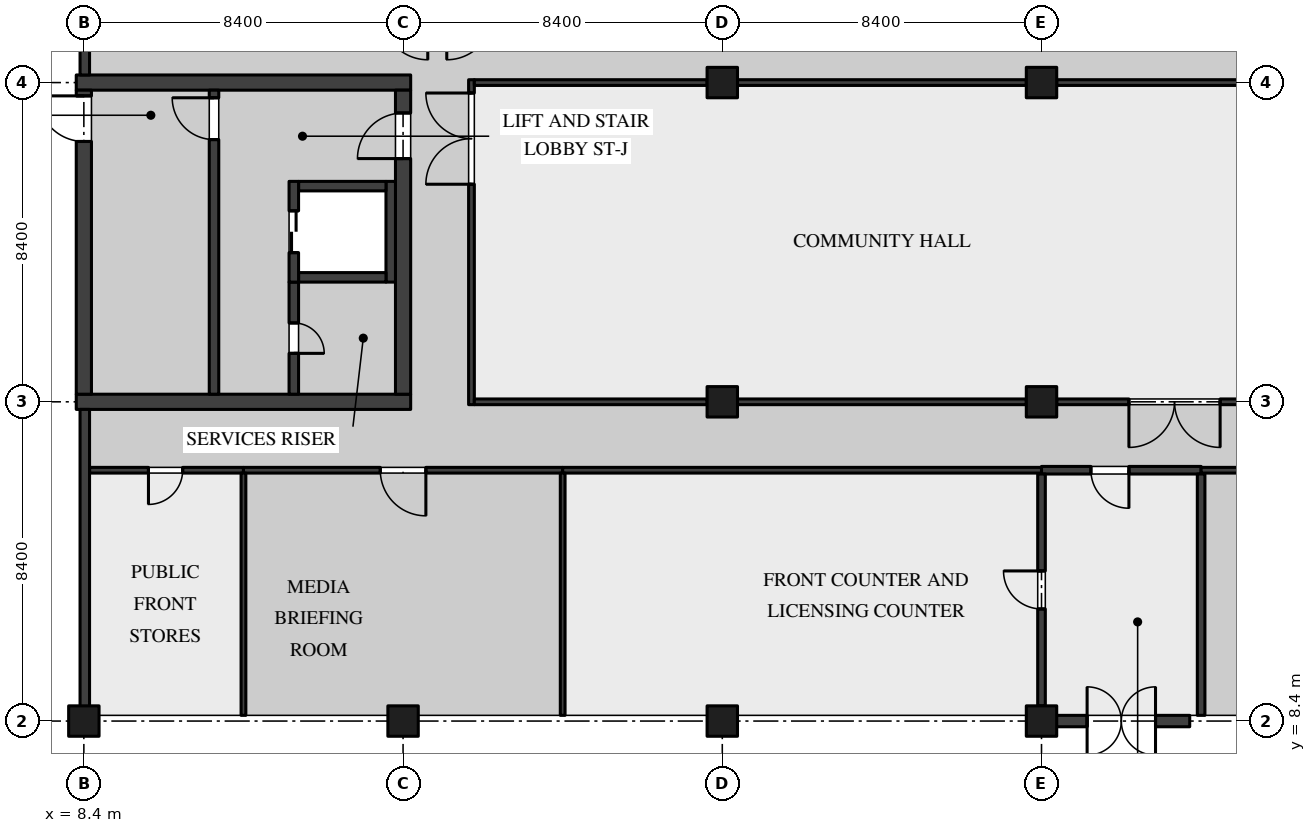
"""IFC4 building model, lengths in metres.
Left out: names, types, materials, properties, quantities, classifications, styles, units other than length and angle.
Written with IfcOpenShell. Run it as: python <this file> out.ifc"""

import sys

from ifc_helpers import new_model, si_unit, direction, frame, frame_2d, origin, origin_2d, place, context, subcontext, project, spatial, rectangle, extrude, element, fill, save


model = new_model("IFC4")
c1 = context("Model", 3, precision=1e-05, world=origin(), true_north=direction((0.0, 1.0)))
c2 = subcontext(c1, "Body", "Model", "MODEL_VIEW")
j1 = project(units=[si_unit("LENGTHUNIT", "METRE"), si_unit("PLANEANGLEUNIT", "RADIAN")], contexts=[c1])
p1 = place(None, origin())
s1 = spatial("IfcSite", under=j1, at=p1, CompositionType="ELEMENT")
p2 = place(p1, origin())
s2 = spatial("IfcBuilding", under=s1, at=p2, CompositionType="ELEMENT")
p3 = place(p2, origin())
s3 = spatial("IfcBuildingStorey", under=s2, at=p3, CompositionType="ELEMENT", Elevation=0.0)
for number, where, z_axis, x_axis in (
    (1, (8.4, 8.4, 0.0), (0.0, 0.0, 1.0), (1.0, 0.0, 0.0)),
    (2, (16.8, 8.4, 0.0), (0.0, 0.0, 1.0), (1.0, 0.0, 0.0)),
    (3, (25.2, 8.4, 0.0), (0.0, 0.0, 1.0), (1.0, 0.0, 0.0)),
    (4, (25.2, 16.8, 0.0), (0.0, 0.0, 1.0), (1.0, 0.0, 0.0)),
    (5, (25.2, 25.2, 0.0), (0.0, 0.0, 1.0), (1.0, 0.0, 0.0)),
    (6, (33.6, 8.4, 0.0), (0.0, 0.0, 1.0), (1.0, 0.0, 0.0)),
    (7, (33.6, 16.8, 0.0), (0.0, 0.0, 1.0), (1.0, 0.0, 0.0)),
    (8, (33.6, 25.2, 0.0), (0.0, 0.0, 1.0), (1.0, 0.0, 0.0)),
):
    element("IfcColumn", number, at=place(p3, frame(where, z_axis=z_axis, x_axis=x_axis)), inside=s3, PredefinedType="COLUMN", context=c2, shape_type="SweptSolid", body=[
        extrude(rectangle(XDim=0.8, YDim=0.8, at=origin_2d()), origin(), (0.0, 0.0, 1.0), 5.05),
    ])
for number, where, z_axis, x_axis in (
    (9, (8.2, 16.8, 0.0), (0.0, 0.0, 1.0), (1.0, 0.0, 0.0)),
    (10, (8.2, 25.2, 0.0), (0.0, 0.0, 1.0), (1.0, 0.0, 0.0)),
):
    element("IfcWall", number, at=place(p3, frame(where, z_axis=z_axis, x_axis=x_axis)), inside=s3, PredefinedType="SHEAR", context=c2, shape_type="SweptSolid", body=[
        extrude(rectangle(XDim=8.8, YDim=0.4, at=frame_2d((4.4, 0.0))), origin(), (0.0, 0.0, 1.0), 5.05),
    ])
p4 = place(p3, frame((8.4, 17.0, 0.0), z_axis=(0.0, 0.0, 1.0), x_axis=(0.0, 1.0, 0.0)))
e11 = element("IfcWall", 11, at=p4, inside=s3, PredefinedType="SHEAR", context=c2, shape_type="SweptSolid", body=[
    extrude(rectangle(XDim=8.0, YDim=0.4, at=frame_2d((4.0, 0.0))), origin(), (0.0, 0.0, 1.0), 5.05),
])
p5 = place(p4, frame((6.65, 0.0, 0.0)))
e12 = element("IfcOpeningElement", 12, at=p5, cuts=e11, PredefinedType="OPENING", context=c2, shape_type="SweptSolid", body=[
    extrude(rectangle(XDim=1.2, YDim=2.1, at=frame_2d((0.6, 1.05))), frame((0.0, 0.21, 0.0), z_axis=(0.0, -1.0, 0.0), x_axis=(1.0, 0.0, 0.0)), (0.0, 0.0, 1.0), 0.42),
])
p6 = place(p3, frame((16.8, 17.0, 0.0), z_axis=(0.0, 0.0, 1.0), x_axis=(0.0, 1.0, 0.0)))
e13 = element("IfcWall", 13, at=p6, inside=s3, PredefinedType="SHEAR", context=c2, shape_type="SweptSolid", body=[
    extrude(rectangle(XDim=8.0, YDim=0.4, at=frame_2d((4.0, 0.0))), origin(), (0.0, 0.0, 1.0), 5.05),
])
p7 = place(p6, frame((6.2, 0.0, 0.0)))
e14 = element("IfcOpeningElement", 14, at=p7, cuts=e13, PredefinedType="OPENING", context=c2, shape_type="SweptSolid", body=[
    extrude(rectangle(XDim=1.2, YDim=2.1, at=frame_2d((0.6, 1.05))), frame((0.0, 0.21, 0.0), z_axis=(0.0, -1.0, 0.0), x_axis=(1.0, 0.0, 0.0)), (0.0, 0.0, 1.0), 0.42),
])
p8 = place(p3, frame((11.825, 25.0, 0.0), z_axis=(0.0, 0.0, 1.0), x_axis=(0.0, -1.0, 0.0)))
e15 = element("IfcWall", 15, at=p8, inside=s3, PredefinedType="SOLIDWALL", context=c2, shape_type="SweptSolid", body=[
    extrude(rectangle(XDim=8.0, YDim=0.25, at=frame_2d((4.0, 0.0))), origin(), (0.0, 0.0, 1.0), 5.05),
])
p9 = place(p8, frame((0.2, 0.0, 0.0)))
e16 = element("IfcOpeningElement", 16, at=p9, cuts=e15, PredefinedType="OPENING", context=c2, shape_type="SweptSolid", body=[
    extrude(rectangle(XDim=1.1, YDim=2.1, at=frame_2d((0.55, 1.05))), frame((0.0, 0.135, 0.0), z_axis=(0.0, -1.0, 0.0), x_axis=(1.0, 0.0, 0.0)), (0.0, 0.0, 1.0), 0.27),
])
p10 = place(p3, frame((13.925, 19.95, 0.0), z_axis=(0.0, 0.0, 1.0), x_axis=(0.0, -1.0, 0.0)))
e17 = element("IfcWall", 17, at=p10, inside=s3, PredefinedType="SOLIDWALL", context=c2, shape_type="SweptSolid", body=[
    extrude(rectangle(XDim=2.95, YDim=0.25, at=frame_2d((1.475, 0.0))), origin(), (0.0, 0.0, 1.0), 5.05),
])
p11 = place(p10, frame((1.075, 0.0, 0.0)))
e18 = element("IfcOpeningElement", 18, at=p11, cuts=e17, PredefinedType="OPENING", context=c2, shape_type="SweptSolid", body=[
    extrude(rectangle(XDim=0.8, YDim=2.1, at=frame_2d((0.4, 1.05))), frame((0.0, 0.135, 0.0), z_axis=(0.0, -1.0, 0.0), x_axis=(1.0, 0.0, 0.0)), (0.0, 0.0, 1.0), 0.27),
])
p12 = place(p3, frame((16.475, 19.95, 0.0), z_axis=(0.0, 0.0, 1.0), x_axis=(0.0, 1.0, 0.0)))
e19 = element("IfcWall", 19, at=p12, inside=s3, PredefinedType="SOLIDWALL", context=c2, shape_type="SweptSolid", body=[
    extrude(rectangle(XDim=2.65, YDim=0.25, at=frame_2d((1.325, 0.0))), origin(), (0.0, 0.0, 1.0), 5.05),
])
for number, where, z_axis, x_axis in (
    (20, (14.05, 22.475, 0.0), (0.0, 0.0, 1.0), (1.0, 0.0, 0.0)),
    (21, (14.05, 20.075, 0.0), (0.0, 0.0, 1.0), (1.0, 0.0, 0.0)),
):
    element("IfcWall", number, at=place(p3, frame(where, z_axis=z_axis, x_axis=x_axis)), inside=s3, PredefinedType="SOLIDWALL", context=c2, shape_type="SweptSolid", body=[
        extrude(rectangle(XDim=2.3, YDim=0.25, at=frame_2d((1.15, 0.0))), origin(), (0.0, 0.0, 1.0), 5.05),
    ])
p13 = place(p3, frame((13.925, 19.95, 0.0), z_axis=(0.0, 0.0, 1.0), x_axis=(0.0, 1.0, 0.0)))
e22 = element("IfcWall", 22, at=p13, inside=s3, PredefinedType="SOLIDWALL", context=c2, shape_type="SweptSolid", body=[
    extrude(rectangle(XDim=2.65, YDim=0.25, at=frame_2d((1.325, 0.0))), origin(), (0.0, 0.0, 1.0), 5.05),
])
p14 = place(p13, frame((0.775, 0.0, 0.0)))
e23 = element("IfcOpeningElement", 23, at=p14, cuts=e22, PredefinedType="OPENING", context=c2, shape_type="SweptSolid", body=[
    extrude(rectangle(XDim=1.1, YDim=2.1, at=frame_2d((0.55, 1.05))), frame((0.0, 0.135, 0.0), z_axis=(0.0, -1.0, 0.0), x_axis=(1.0, 0.0, 0.0)), (0.0, 0.0, 1.0), 0.27),
])
p15 = place(p3, frame((18.6, 16.725, 0.0), z_axis=(0.0, 0.0, 1.0), x_axis=(0.0, 1.0, 0.0)))
e24 = element("IfcWall", 24, at=p15, inside=s3, PredefinedType="PARTITIONING", context=c2, shape_type="SweptSolid", body=[
    extrude(rectangle(XDim=8.55, YDim=0.15, at=frame_2d((4.275, 0.0))), origin(), (0.0, 0.0, 1.0), 5.05),
])
p16 = place(p15, frame((5.8, 0.0, 0.0)))
e25 = element("IfcOpeningElement", 25, at=p16, cuts=e24, PredefinedType="OPENING", context=c2, shape_type="SweptSolid", body=[
    extrude(rectangle(XDim=2.4, YDim=2.7, at=frame_2d((1.2, 1.35))), frame((0.0, 0.085, 0.0), z_axis=(0.0, -1.0, 0.0), x_axis=(1.0, 0.0, 0.0)), (0.0, 0.0, 1.0), 0.17),
])
p17 = place(p3, frame((18.675, 16.8, 0.0), z_axis=(0.0, 0.0, 1.0), x_axis=(1.0, 0.0, 0.0)))
e26 = element("IfcWall", 26, at=p17, inside=s3, PredefinedType="PARTITIONING", context=c2, shape_type="SweptSolid", body=[
    extrude(rectangle(XDim=6.125, YDim=0.15, at=frame_2d((3.062, 0.0))), origin(), (0.0, 0.0, 1.0), 5.05),
])
p18 = place(p3, frame((25.6, 16.8, 0.0), z_axis=(0.0, 0.0, 1.0), x_axis=(1.0, 0.0, 0.0)))
e27 = element("IfcWall", 27, at=p18, inside=s3, PredefinedType="PARTITIONING", context=c2, shape_type="SweptSolid", body=[
    extrude(rectangle(XDim=7.6, YDim=0.15, at=frame_2d((3.8, 0.0))), origin(), (0.0, 0.0, 1.0), 5.05),
])
p19 = place(p3, frame((34.0, 16.8, 0.0), z_axis=(0.0, 0.0, 1.0), x_axis=(1.0, 0.0, 0.0)))
e28 = element("IfcWall", 28, at=p19, inside=s3, PredefinedType="PARTITIONING", context=c2, shape_type="SweptSolid", body=[
    extrude(rectangle(XDim=6.2, YDim=0.15, at=frame_2d((3.1, 0.0))), origin(), (0.0, 0.0, 1.0), 5.05),
])
p20 = place(p19, frame((1.9, 0.0, 0.0)))
e29 = element("IfcOpeningElement", 29, at=p20, cuts=e28, PredefinedType="OPENING", context=c2, shape_type="SweptSolid", body=[
    extrude(rectangle(XDim=2.4, YDim=2.7, at=frame_2d((1.2, 1.35))), frame((0.0, 0.085, 0.0), z_axis=(0.0, -1.0, 0.0), x_axis=(1.0, 0.0, 0.0)), (0.0, 0.0, 1.0), 0.17),
])
p21 = place(p3, frame((18.675, 25.2, 0.0), z_axis=(0.0, 0.0, 1.0), x_axis=(1.0, 0.0, 0.0)))
e30 = element("IfcWall", 30, at=p21, inside=s3, PredefinedType="PARTITIONING", context=c2, shape_type="SweptSolid", body=[
    extrude(rectangle(XDim=6.125, YDim=0.15, at=frame_2d((3.062, 0.0))), origin(), (0.0, 0.0, 1.0), 5.05),
])
p22 = place(p3, frame((25.6, 25.2, 0.0), z_axis=(0.0, 0.0, 1.0), x_axis=(1.0, 0.0, 0.0)))
e31 = element("IfcWall", 31, at=p22, inside=s3, PredefinedType="PARTITIONING", context=c2, shape_type="SweptSolid", body=[
    extrude(rectangle(XDim=7.6, YDim=0.15, at=frame_2d((3.8, 0.0))), origin(), (0.0, 0.0, 1.0), 5.05),
])
p23 = place(p3, frame((34.0, 25.2, 0.0), z_axis=(0.0, 0.0, 1.0), x_axis=(1.0, 0.0, 0.0)))
e32 = element("IfcWall", 32, at=p23, inside=s3, PredefinedType="PARTITIONING", context=c2, shape_type="SweptSolid", body=[
    extrude(rectangle(XDim=6.2, YDim=0.15, at=frame_2d((3.1, 0.0))), origin(), (0.0, 0.0, 1.0), 5.05),
])
p24 = place(p3, frame((8.55, 15.0, 0.0), z_axis=(0.0, 0.0, 1.0), x_axis=(1.0, 0.0, 0.0)))
e33 = element("IfcWall", 33, at=p24, inside=s3, PredefinedType="PARTITIONING", context=c2, shape_type="SweptSolid", body=[
    extrude(rectangle(XDim=4.05, YDim=0.15, at=frame_2d((2.025, 0.0))), origin(), (0.0, 0.0, 1.0), 5.05),
])
p25 = place(p24, frame((1.55, 0.0, 0.0)))
e34 = element("IfcOpeningElement", 34, at=p25, cuts=e33, PredefinedType="OPENING", context=c2, shape_type="SweptSolid", body=[
    extrude(rectangle(XDim=0.9, YDim=2.1, at=frame_2d((0.45, 1.05))), frame((0.0, 0.085, 0.0), z_axis=(0.0, -1.0, 0.0), x_axis=(1.0, 0.0, 0.0)), (0.0, 0.0, 1.0), 0.17),
])
p26 = place(p3, frame((12.6, 15.0, 0.0), z_axis=(0.0, 0.0, 1.0), x_axis=(1.0, 0.0, 0.0)))
e35 = element("IfcWall", 35, at=p26, inside=s3, PredefinedType="PARTITIONING", context=c2, shape_type="SweptSolid", body=[
    extrude(rectangle(XDim=8.4, YDim=0.15, at=frame_2d((4.2, 0.0))), origin(), (0.0, 0.0, 1.0), 5.05),
])
p27 = place(p26, frame((3.6, 0.0, 0.0)))
e36 = element("IfcOpeningElement", 36, at=p27, cuts=e35, PredefinedType="OPENING", context=c2, shape_type="SweptSolid", body=[
    extrude(rectangle(XDim=1.2, YDim=2.4, at=frame_2d((0.6, 1.2))), frame((0.0, 0.085, 0.0), z_axis=(0.0, -1.0, 0.0), x_axis=(1.0, 0.0, 0.0)), (0.0, 0.0, 1.0), 0.17),
])
p28 = place(p3, frame((21.0, 15.0, 0.0), z_axis=(0.0, 0.0, 1.0), x_axis=(1.0, 0.0, 0.0)))
e37 = element("IfcWall", 37, at=p28, inside=s3, PredefinedType="PARTITIONING", context=c2, shape_type="SweptSolid", body=[
    extrude(rectangle(XDim=12.6, YDim=0.15, at=frame_2d((6.3, 0.0))), origin(), (0.0, 0.0, 1.0), 5.05),
])
p29 = place(p3, frame((33.6, 15.0, 0.0), z_axis=(0.0, 0.0, 1.0), x_axis=(1.0, 0.0, 0.0)))
e38 = element("IfcWall", 38, at=p29, inside=s3, PredefinedType="PARTITIONING", context=c2, shape_type="SweptSolid", body=[
    extrude(rectangle(XDim=4.2, YDim=0.2, at=frame_2d((2.1, 0.0))), origin(), (0.0, 0.0, 1.0), 5.05),
])
p30 = place(p29, frame((1.3, 0.0, 0.0)))
e39 = element("IfcOpeningElement", 39, at=p30, cuts=e38, PredefinedType="OPENING", context=c2, shape_type="SweptSolid", body=[
    extrude(rectangle(XDim=1.0, YDim=2.4, at=frame_2d((0.5, 1.2))), frame((0.0, 0.11, 0.0), z_axis=(0.0, -1.0, 0.0), x_axis=(1.0, 0.0, 0.0)), (0.0, 0.0, 1.0), 0.22),
])
p31 = place(p3, frame((37.8, 15.0, 0.0), z_axis=(0.0, 0.0, 1.0), x_axis=(1.0, 0.0, 0.0)))
e40 = element("IfcWall", 40, at=p31, inside=s3, PredefinedType="PARTITIONING", context=c2, shape_type="SweptSolid", body=[
    extrude(rectangle(XDim=4.2, YDim=0.15, at=frame_2d((2.1, 0.0))), origin(), (0.0, 0.0, 1.0), 5.05),
])
p32 = place(p31, frame((1.55, 0.0, 0.0)))
e41 = element("IfcOpeningElement", 41, at=p32, cuts=e40, PredefinedType="OPENING", context=c2, shape_type="SweptSolid", body=[
    extrude(rectangle(XDim=1.1, YDim=2.1, at=frame_2d((0.55, 1.05))), frame((0.0, 0.085, 0.0), z_axis=(0.0, -1.0, 0.0), x_axis=(1.0, 0.0, 0.0)), (0.0, 0.0, 1.0), 0.17),
])
for number, where, z_axis, x_axis in (
    (42, (12.6, 8.55, 0.0), (0.0, 0.0, 1.0), (0.0, 1.0, 0.0)),
    (43, (21.0, 8.55, 0.0), (0.0, 0.0, 1.0), (0.0, 1.0, 0.0)),
):
    element("IfcWall", number, at=place(p3, frame(where, z_axis=z_axis, x_axis=x_axis)), inside=s3, PredefinedType="PARTITIONING", context=c2, shape_type="SweptSolid", body=[
        extrude(rectangle(XDim=6.375, YDim=0.125, at=frame_2d((3.188, 0.0))), origin(), (0.0, 0.0, 1.0), 5.05),
    ])
p33 = place(p3, frame((33.6, 8.8, 0.0), z_axis=(0.0, 0.0, 1.0), x_axis=(0.0, 1.0, 0.0)))
e44 = element("IfcWall", 44, at=p33, inside=s3, PredefinedType="PARTITIONING", context=c2, shape_type="SweptSolid", body=[
    extrude(rectangle(XDim=6.1, YDim=0.2, at=frame_2d((3.05, 0.0))), origin(), (0.0, 0.0, 1.0), 5.05),
])
p34 = place(p33, frame((2.55, 0.0, 0.0)))
e45 = element("IfcOpeningElement", 45, at=p34, cuts=e44, PredefinedType="OPENING", context=c2, shape_type="SweptSolid", body=[
    extrude(rectangle(XDim=1.0, YDim=2.4, at=frame_2d((0.5, 1.2))), frame((0.0, 0.11, 0.0), z_axis=(0.0, -1.0, 0.0), x_axis=(1.0, 0.0, 0.0)), (0.0, 0.0, 1.0), 0.22),
])
p35 = place(p3, frame((37.8, 8.55, 0.0), z_axis=(0.0, 0.0, 1.0), x_axis=(0.0, 1.0, 0.0)))
e46 = element("IfcWall", 46, at=p35, inside=s3, PredefinedType="PARTITIONING", context=c2, shape_type="SweptSolid", body=[
    extrude(rectangle(XDim=6.35, YDim=0.2, at=frame_2d((3.175, 0.0))), origin(), (0.0, 0.0, 1.0), 5.05),
])
p36 = place(p3, frame((8.425, 33.17, 0.0), z_axis=(0.0, 0.0, 1.0), x_axis=(0.0, -1.0, 0.0)))
e47 = element("IfcWall", 47, at=p36, inside=s3, PredefinedType="SOLIDWALL", context=c2, shape_type="SweptSolid", body=[
    extrude(rectangle(XDim=7.77, YDim=0.25, at=frame_2d((3.885, 0.0))), origin(), (0.0, 0.0, 1.0), 5.05),
])
p37 = place(p3, frame((8.425, 16.6, 0.0), z_axis=(0.0, 0.0, 1.0), x_axis=(0.0, -1.0, 0.0)))
e48 = element("IfcWall", 48, at=p37, inside=s3, PredefinedType="SOLIDWALL", context=c2, shape_type="SweptSolid", body=[
    extrude(rectangle(XDim=7.82, YDim=0.25, at=frame_2d((3.91, 0.0))), origin(), (0.0, 0.0, 1.0), 5.05),
])
p38 = place(p3, frame((33.98, 8.4, 0.0), z_axis=(0.0, 0.0, 1.0), x_axis=(1.0, 0.0, 0.0)))
e49 = element("IfcWall", 49, at=p38, inside=s3, PredefinedType="SOLIDWALL", context=c2, shape_type="SweptSolid", body=[
    extrude(rectangle(XDim=3.52, YDim=0.3, at=frame_2d((1.76, 0.0))), origin(), (0.0, 0.0, 1.0), 5.05),
])
p39 = place(p38, frame((0.82, 0.0, 0.0)))
e50 = element("IfcOpeningElement", 50, at=p39, cuts=e49, PredefinedType="OPENING", context=c2, shape_type="SweptSolid", body=[
    extrude(rectangle(XDim=1.8, YDim=2.4, at=frame_2d((0.9, 1.2))), frame((0.0, 0.16, 0.0), z_axis=(0.0, -1.0, 0.0), x_axis=(1.0, 0.0, 0.0)), (0.0, 0.0, 1.0), 0.32),
])
p40 = place(p7, origin())
e51 = element("IfcDoor", 51, at=p40, inside=s3, OperationType="SINGLE_SWING_RIGHT", PredefinedType="DOOR", context=c2, shape_type="SweptSolid", body=[
    extrude(rectangle(XDim=1.2, YDim=2.1, at=frame_2d((0.6, 1.05))), frame((0.0, 0.035, 0.0), z_axis=(0.0, -1.0, 0.0), x_axis=(1.0, 0.0, 0.0)), (0.0, 0.0, 1.0), 0.07),
])
fill(e14, e51)
p41 = place(p11, origin())
e52 = element("IfcDoor", 52, at=p41, inside=s3, OperationType="SINGLE_SWING_LEFT", PredefinedType="DOOR", context=c2, shape_type="SweptSolid", body=[
    extrude(rectangle(XDim=0.8, YDim=2.1, at=frame_2d((0.4, 1.05))), frame((0.0, 0.035, 0.0), z_axis=(0.0, -1.0, 0.0), x_axis=(1.0, 0.0, 0.0)), (0.0, 0.0, 1.0), 0.07),
])
fill(e18, e52)
p42 = place(p9, frame((1.1, 0.0, 0.0), z_axis=(0.0, 0.0, 1.0), x_axis=(-1.0, 0.0, 0.0)))
e53 = element("IfcDoor", 53, at=p42, inside=s3, OperationType="SINGLE_SWING_LEFT", PredefinedType="DOOR", context=c2, shape_type="SweptSolid", body=[
    extrude(rectangle(XDim=1.1, YDim=2.1, at=frame_2d((0.55, 1.05))), frame((0.0, 0.035, 0.0), z_axis=(0.0, -1.0, 0.0), x_axis=(1.0, 0.0, 0.0)), (0.0, 0.0, 1.0), 0.07),
])
fill(e16, e53)
p43 = place(p5, origin())
e54 = element("IfcDoor", 54, at=p43, inside=s3, OperationType="SINGLE_SWING_LEFT", PredefinedType="DOOR", context=c2, shape_type="SweptSolid", body=[
    extrude(rectangle(XDim=1.2, YDim=2.1, at=frame_2d((0.6, 1.05))), frame((0.0, 0.035, 0.0), z_axis=(0.0, -1.0, 0.0), x_axis=(1.0, 0.0, 0.0)), (0.0, 0.0, 1.0), 0.07),
])
fill(e12, e54)
p44 = place(p14, origin())
e55 = element("IfcDoor", 55, at=p44, inside=s3, OperationType="DOUBLE_DOOR_SLIDING", PredefinedType="DOOR", context=c2, shape_type="SweptSolid", body=[
    extrude(rectangle(XDim=1.1, YDim=2.1, at=frame_2d((0.55, 1.05))), frame((0.0, 0.04, 0.0), z_axis=(0.0, -1.0, 0.0), x_axis=(1.0, 0.0, 0.0)), (0.0, 0.0, 1.0), 0.08),
])
fill(e23, e55)
p45 = place(p16, origin())
e56 = element("IfcDoor", 56, at=p45, inside=s3, OperationType="DOUBLE_DOOR_SINGLE_SWING", PredefinedType="DOOR", context=c2, shape_type="SweptSolid", body=[
    extrude(rectangle(XDim=2.4, YDim=2.7, at=frame_2d((1.2, 1.35))), frame((0.0, 0.025, 0.0), z_axis=(0.0, -1.0, 0.0), x_axis=(1.0, 0.0, 0.0)), (0.0, 0.0, 1.0), 0.05),
])
fill(e25, e56)
p46 = place(p20, frame((2.4, 0.0, 0.0), z_axis=(0.0, 0.0, 1.0), x_axis=(-1.0, 0.0, 0.0)))
e57 = element("IfcDoor", 57, at=p46, inside=s3, OperationType="DOUBLE_DOOR_SINGLE_SWING", PredefinedType="DOOR", context=c2, shape_type="SweptSolid", body=[
    extrude(rectangle(XDim=2.4, YDim=2.7, at=frame_2d((1.2, 1.35))), frame((0.0, 0.025, 0.0), z_axis=(0.0, -1.0, 0.0), x_axis=(1.0, 0.0, 0.0)), (0.0, 0.0, 1.0), 0.05),
])
fill(e29, e57)
p47 = place(p25, frame((0.9, 0.0, 0.0), z_axis=(0.0, 0.0, 1.0), x_axis=(-1.0, 0.0, 0.0)))
e58 = element("IfcDoor", 58, at=p47, inside=s3, OperationType="SINGLE_SWING_LEFT", PredefinedType="DOOR", context=c2, shape_type="SweptSolid", body=[
    extrude(rectangle(XDim=0.9, YDim=2.1, at=frame_2d((0.45, 1.05))), frame((0.0, 0.025, 0.0), z_axis=(0.0, -1.0, 0.0), x_axis=(1.0, 0.0, 0.0)), (0.0, 0.0, 1.0), 0.05),
])
fill(e34, e58)
p48 = place(p27, frame((1.2, 0.0, 0.0), z_axis=(0.0, 0.0, 1.0), x_axis=(-1.0, 0.0, 0.0)))
e59 = element("IfcDoor", 59, at=p48, inside=s3, OperationType="SINGLE_SWING_RIGHT", PredefinedType="DOOR", context=c2, shape_type="SweptSolid", body=[
    extrude(rectangle(XDim=1.2, YDim=2.4, at=frame_2d((0.6, 1.2))), frame((0.0, 0.025, 0.0), z_axis=(0.0, -1.0, 0.0), x_axis=(1.0, 0.0, 0.0)), (0.0, 0.0, 1.0), 0.05),
])
fill(e36, e59)
p49 = place(p34, origin())
e60 = element("IfcDoor", 60, at=p49, inside=s3, OperationType="SINGLE_SWING_LEFT", PredefinedType="DOOR", context=c2, shape_type="SweptSolid", body=[
    extrude(rectangle(XDim=1.0, YDim=2.4, at=frame_2d((0.5, 1.2))), frame((0.0, 0.035, 0.0), z_axis=(0.0, -1.0, 0.0), x_axis=(1.0, 0.0, 0.0)), (0.0, 0.0, 1.0), 0.07),
])
fill(e45, e60)
p50 = place(p30, frame((1.0, 0.0, 0.0), z_axis=(0.0, 0.0, 1.0), x_axis=(-1.0, 0.0, 0.0)))
e61 = element("IfcDoor", 61, at=p50, inside=s3, OperationType="SINGLE_SWING_RIGHT", PredefinedType="DOOR", context=c2, shape_type="SweptSolid", body=[
    extrude(rectangle(XDim=1.0, YDim=2.4, at=frame_2d((0.5, 1.2))), frame((0.0, 0.03, 0.0), z_axis=(0.0, -1.0, 0.0), x_axis=(1.0, 0.0, 0.0)), (0.0, 0.0, 1.0), 0.06),
])
fill(e39, e61)
p51 = place(p39, frame((1.8, 0.0, 0.0), z_axis=(0.0, 0.0, 1.0), x_axis=(-1.0, 0.0, 0.0)))
e62 = element("IfcDoor", 62, at=p51, inside=s3, OperationType="DOUBLE_DOOR_DOUBLE_SWING", PredefinedType="DOOR", context=c2, shape_type="SweptSolid", body=[
    extrude(rectangle(XDim=1.8, YDim=2.4, at=frame_2d((0.9, 1.2))), frame((0.0, 0.025, 0.0), z_axis=(0.0, -1.0, 0.0), x_axis=(1.0, 0.0, 0.0)), (0.0, 0.0, 1.0), 0.05),
])
fill(e50, e62)
save(model, sys.argv[1])
